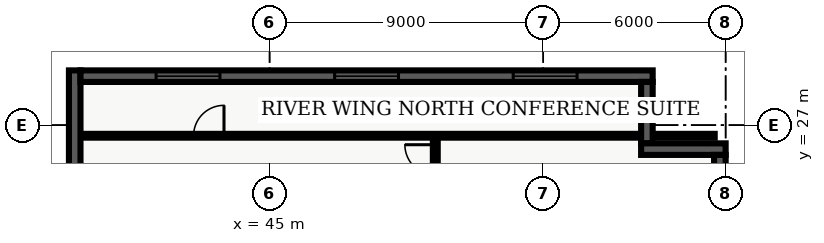
"""IFC4 building model, lengths in metres.
Left out: names, types, materials, properties, quantities, classifications, styles, units other than length and angle.
Written with IfcOpenShell. Run it as: python <this file> out.ifc"""

import sys

from ifc_helpers import new_model, entity, si_unit, converted_unit, direction, frame, origin_with_axes, origin_2d_with_axis, place, context, subcontext, project, spatial, polyline, rectangle, outline, extrude, element, fill, save


model = new_model("IFC4")
c1 = context("Model", 3, precision=1e-05, world=origin_with_axes(), true_north=direction((0.0, 1.0)))
c2 = subcontext(c1, "Body", "Model", "MODEL_VIEW")
j1 = project(units=[si_unit("LENGTHUNIT", "METRE"), converted_unit("PLANEANGLEUNIT", "DEGREE", entity("IfcPlaneAngleMeasure", 0.017), si_unit("PLANEANGLEUNIT", "RADIAN"), dimensions=[0, 0, 0, 0, 0, 0, 0])], contexts=[c1])
p1 = place(None, origin_with_axes())
s1 = spatial("IfcSite", under=j1, at=p1, CompositionType="ELEMENT")
p2 = place(p1, origin_with_axes())
s2 = spatial("IfcBuilding", under=s1, at=p2, CompositionType="ELEMENT")
p3 = place(p2, frame((0.0, 0.0, 104.7), z_axis=(0.0, 0.0, 1.0), x_axis=(1.0, 0.0, 0.0)))
s3 = spatial("IfcBuildingStorey", under=s2, at=p3, CompositionType="ELEMENT", Elevation=104.7)
p4 = place(p3, frame((50.45, 7.85, 0.0), z_axis=(0.0, 0.0, 1.0), x_axis=(0.0, 1.0, 0.0)))
e1 = element("IfcWall", 1, at=p4, inside=s3, PredefinedType="PARTITIONING", context=c2, shape_type="SweptSolid", body=[
    extrude(outline(polyline([(0.0, -0.08), (18.8, -0.08), (18.8, 0.08), (0.0, 0.08), (0.0, -0.08)])), origin_with_axes(), (0.0, 0.0, 1.0), 2.7),
])
p5 = place(p4, frame((4.351, 0.0, 0.0), z_axis=(0.0, 0.0, 1.0), x_axis=(1.0, 0.0, 0.0)))
e2 = element("IfcOpeningElement", 2, at=p5, cuts=e1, PredefinedType="OPENING", context=c2, shape_type="SweptSolid", body=[
    extrude(rectangle(XDim=1.0, YDim=0.18, at=origin_2d_with_axis()), origin_with_axes(), (0.0, 0.0, 1.0), 2.15),
])
p6 = place(p4, frame((7.768, 0.0, 0.0), z_axis=(0.0, 0.0, 1.0), x_axis=(1.0, 0.0, 0.0)))
e3 = element("IfcOpeningElement", 3, at=p6, cuts=e1, PredefinedType="OPENING", context=c2, shape_type="SweptSolid", body=[
    extrude(rectangle(XDim=1.0, YDim=0.18, at=origin_2d_with_axis()), origin_with_axes(), (0.0, 0.0, 1.0), 2.15),
])
p7 = place(p4, frame((13.043, 0.0, 0.0), z_axis=(0.0, 0.0, 1.0), x_axis=(1.0, 0.0, 0.0)))
e4 = element("IfcOpeningElement", 4, at=p7, cuts=e1, PredefinedType="OPENING", context=c2, shape_type="SweptSolid", body=[
    extrude(rectangle(XDim=1.0, YDim=0.18, at=origin_2d_with_axis()), origin_with_axes(), (0.0, 0.0, 1.0), 2.15),
])
p8 = place(p4, frame((18.005, 0.0, 0.0), z_axis=(0.0, 0.0, 1.0), x_axis=(1.0, 0.0, 0.0)))
e5 = element("IfcOpeningElement", 5, at=p8, cuts=e1, PredefinedType="OPENING", context=c2, shape_type="SweptSolid", body=[
    extrude(rectangle(XDim=1.0, YDim=0.18, at=origin_2d_with_axis()), origin_with_axes(), (0.0, 0.0, 1.0), 2.15),
])
p9 = place(p3, frame((38.76, 26.65, 0.0), z_axis=(0.0, 0.0, 1.0), x_axis=(1.0, 0.0, 0.0)))
e6 = element("IfcWall", 6, at=p9, inside=s3, PredefinedType="PARTITIONING", context=c2, shape_type="SweptSolid", body=[
    extrude(outline(polyline([(0.0, -0.062), (20.88, -0.062), (20.88, 0.062), (0.0, 0.062), (0.0, -0.062)])), origin_with_axes(), (0.0, 0.0, 1.0), 2.7),
])
p10 = place(p9, frame((4.24, 0.0, 0.0), z_axis=(0.0, 0.0, 1.0), x_axis=(1.0, 0.0, 0.0)))
e7 = element("IfcOpeningElement", 7, at=p10, cuts=e6, PredefinedType="OPENING", context=c2, shape_type="SweptSolid", body=[
    extrude(rectangle(XDim=1.0, YDim=0.145, at=origin_2d_with_axis()), origin_with_axes(), (0.0, 0.0, 1.0), 2.15),
])
p11 = place(p3, frame((38.59, 14.02, 0.0), z_axis=(0.0, 0.0, 1.0), x_axis=(0.0, 1.0, 0.0)))
e8 = element("IfcWall", 8, at=p11, inside=s3, PredefinedType="SOLIDWALL", context=c2, shape_type="SweptSolid", body=[
    extrude(outline(polyline([(0.0, -0.19), (14.78, -0.19), (14.78, 0.19), (0.0, 0.19), (0.0, -0.19)])), origin_with_axes(), (0.0, 0.0, 1.0), 3.66),
])
p12 = place(p3, frame((38.78, 28.61, 0.0), z_axis=(0.0, 0.0, 1.0), x_axis=(1.0, 0.0, 0.0)))
e9 = element("IfcWall", 9, at=p12, inside=s3, PredefinedType="SOLIDWALL", context=c2, shape_type="SweptSolid", body=[
    extrude(outline(polyline([(0.0, -0.19), (18.82, -0.19), (18.82, 0.19), (0.0, 0.19), (0.0, -0.19)])), origin_with_axes(), (0.0, 0.0, 1.0), 3.66),
])
p13 = place(p12, frame((3.537, 0.0, 0.45), z_axis=(0.0, 0.0, 1.0), x_axis=(1.0, 0.0, 0.0)))
e10 = element("IfcOpeningElement", 10, at=p13, cuts=e9, PredefinedType="OPENING", context=c2, shape_type="SweptSolid", body=[
    extrude(rectangle(XDim=2.1, YDim=0.4, at=origin_2d_with_axis()), origin_with_axes(), (0.0, 0.0, 1.0), 2.2),
])
p14 = place(p12, frame((9.41, 0.0, 0.45), z_axis=(0.0, 0.0, 1.0), x_axis=(1.0, 0.0, 0.0)))
e11 = element("IfcOpeningElement", 11, at=p14, cuts=e9, PredefinedType="OPENING", context=c2, shape_type="SweptSolid", body=[
    extrude(rectangle(XDim=2.1, YDim=0.4, at=origin_2d_with_axis()), origin_with_axes(), (0.0, 0.0, 1.0), 2.2),
])
p15 = place(p12, frame((15.283, 0.0, 0.45), z_axis=(0.0, 0.0, 1.0), x_axis=(1.0, 0.0, 0.0)))
e12 = element("IfcOpeningElement", 12, at=p15, cuts=e9, PredefinedType="OPENING", context=c2, shape_type="SweptSolid", body=[
    extrude(rectangle(XDim=2.1, YDim=0.4, at=origin_2d_with_axis()), origin_with_axes(), (0.0, 0.0, 1.0), 2.2),
])
p16 = place(p3, frame((57.41, 28.42, 0.0), z_axis=(0.0, 0.0, 1.0), x_axis=(0.0, -1.0, 0.0)))
e13 = element("IfcWall", 13, at=p16, inside=s3, PredefinedType="SOLIDWALL", context=c2, shape_type="SweptSolid", body=[
    extrude(outline(polyline([(0.0, -0.19), (2.02, -0.19), (2.02, 0.19), (0.0, 0.19), (0.0, -0.19)])), origin_with_axes(), (0.0, 0.0, 1.0), 3.66),
])
p17 = place(p3, frame((57.22, 26.21, 0.0), z_axis=(0.0, 0.0, 1.0), x_axis=(1.0, 0.0, 0.0)))
e14 = element("IfcWall", 14, at=p17, inside=s3, PredefinedType="SOLIDWALL", context=c2, shape_type="SweptSolid", body=[
    extrude(outline(polyline([(0.0, -0.19), (2.78, -0.19), (2.78, 0.19), (0.0, 0.19), (0.0, -0.19)])), origin_with_axes(), (0.0, 0.0, 1.0), 3.66),
])
p18 = place(p3, frame((59.81, 26.02, 0.0), z_axis=(0.0, 0.0, 1.0), x_axis=(0.0, -1.0, 0.0)))
e15 = element("IfcWall", 15, at=p18, inside=s3, PredefinedType="SOLIDWALL", context=c2, shape_type="SweptSolid", body=[
    extrude(outline(polyline([(0.0, -0.19), (23.62, -0.19), (23.62, 0.19), (0.0, 0.19), (0.0, -0.19)])), origin_with_axes(), (0.0, 0.0, 1.0), 3.66),
])
p19 = place(p18, frame((20.218, 0.0, 0.45), z_axis=(0.0, 0.0, 1.0), x_axis=(1.0, 0.0, 0.0)))
e16 = element("IfcOpeningElement", 16, at=p19, cuts=e15, PredefinedType="OPENING", context=c2, shape_type="SweptSolid", body=[
    extrude(rectangle(XDim=2.1, YDim=0.4, at=origin_2d_with_axis()), origin_with_axes(), (0.0, 0.0, 1.0), 2.2),
])
p20 = place(p9, frame((4.24, 0.0, 0.0), z_axis=(0.0, 0.0, 1.0), x_axis=(1.0, 0.0, 0.0)))
e17 = element("IfcDoor", 17, at=p20, inside=s3, OperationType="SINGLE_SWING_RIGHT", PredefinedType="DOOR", context=c2, shape_type="SweptSolid", body=[
    extrude(rectangle(XDim=1.0, YDim=0.075, at=origin_2d_with_axis()), origin_with_axes(), (0.0, 0.0, 1.0), 2.15),
])
fill(e7, e17)
p21 = place(p4, frame((18.005, 0.0, 0.0), z_axis=(0.0, 0.0, 1.0), x_axis=(1.0, 0.0, 0.0)))
e18 = element("IfcDoor", 18, at=p21, inside=s3, OperationType="SINGLE_SWING_RIGHT", PredefinedType="DOOR", context=c2, shape_type="SweptSolid", body=[
    extrude(rectangle(XDim=1.0, YDim=0.09, at=origin_2d_with_axis()), origin_with_axes(), (0.0, 0.0, 1.0), 2.15),
])
fill(e5, e18)
p22 = place(p12, frame((3.537, 0.0, 0.45), z_axis=(0.0, 0.0, 1.0), x_axis=(1.0, 0.0, 0.0)))
e19 = element("IfcWindow", 19, at=p22, inside=s3, PredefinedType="WINDOW", context=c2, shape_type="SweptSolid", body=[
    extrude(rectangle(XDim=2.1, YDim=0.09, at=origin_2d_with_axis()), origin_with_axes(), (0.0, 0.0, 1.0), 2.2),
])
fill(e10, e19)
p23 = place(p12, frame((9.41, 0.0, 0.45), z_axis=(0.0, 0.0, 1.0), x_axis=(1.0, 0.0, 0.0)))
e20 = element("IfcWindow", 20, at=p23, inside=s3, PredefinedType="WINDOW", context=c2, shape_type="SweptSolid", body=[
    extrude(rectangle(XDim=2.1, YDim=0.09, at=origin_2d_with_axis()), origin_with_axes(), (0.0, 0.0, 1.0), 2.2),
])
fill(e11, e20)
p24 = place(p12, frame((15.283, 0.0, 0.45), z_axis=(0.0, 0.0, 1.0), x_axis=(1.0, 0.0, 0.0)))
e21 = element("IfcWindow", 21, at=p24, inside=s3, PredefinedType="WINDOW", context=c2, shape_type="SweptSolid", body=[
    extrude(rectangle(XDim=2.1, YDim=0.09, at=origin_2d_with_axis()), origin_with_axes(), (0.0, 0.0, 1.0), 2.2),
])
fill(e12, e21)
save(model, sys.argv[1])
